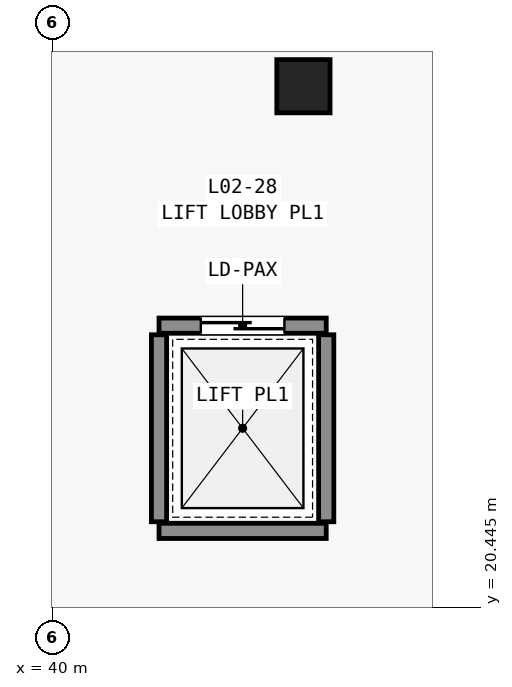
"""IFC4 building model, lengths in metres.
Left out: names, types, materials, properties, quantities, classifications, styles, units other than length and angle.
Written with IfcOpenShell. Run it as: python <this file> out.ifc"""

import sys

from ifc_helpers import new_model, si_unit, direction, frame, frame_2d, origin, origin_2d, place, context, subcontext, project, spatial, rectangle, extrude, element, fill, save


model = new_model("IFC4")
c1 = context("Model", 3, precision=1e-05, world=origin(), true_north=direction((0.0, 1.0)))
c2 = subcontext(c1, "Body", "Model", "MODEL_VIEW")
j1 = project(units=[si_unit("LENGTHUNIT", "METRE"), si_unit("PLANEANGLEUNIT", "RADIAN")], contexts=[c1])
p1 = place(None, origin())
s1 = spatial("IfcSite", under=j1, at=p1, CompositionType="ELEMENT")
p2 = place(p1, origin())
s2 = spatial("IfcBuilding", under=s1, at=p2, CompositionType="ELEMENT")
p3 = place(p2, frame((0.0, 0.0, 11.4)))
s3 = spatial("IfcBuildingStorey", under=s2, at=p3, CompositionType="ELEMENT", Elevation=11.4)
p4 = place(p3, frame((43.3, 27.3, 0.0), z_axis=(0.0, 0.0, 1.0), x_axis=(1.0, 0.0, 0.0)))
e1 = element("IfcColumn", 1, at=p4, inside=s3, PredefinedType="COLUMN", context=c2, shape_type="SweptSolid", body=[
    extrude(rectangle(XDim=0.7, YDim=0.7, at=origin_2d()), origin(), (0.0, 0.0, 1.0), 4.8),
])
p5 = place(p3, frame((41.4, 21.45, 0.0), z_axis=(0.0, 0.0, 1.0), x_axis=(1.0, 0.0, 0.0)))
e2 = element("IfcWall", 2, at=p5, inside=s3, PredefinedType="STANDARD", context=c2, shape_type="SweptSolid", body=[
    extrude(rectangle(XDim=2.2, YDim=0.2, at=frame_2d((1.1, 0.0))), origin(), (0.0, 0.0, 1.0), 4.45),
])
p6 = place(p3, frame((41.4, 24.15, 0.0), z_axis=(0.0, 0.0, 1.0), x_axis=(1.0, 0.0, 0.0)))
e3 = element("IfcWall", 3, at=p6, inside=s3, PredefinedType="STANDARD", context=c2, shape_type="SweptSolid", body=[
    extrude(rectangle(XDim=2.2, YDim=0.2, at=frame_2d((1.1, 0.0))), origin(), (0.0, 0.0, 1.0), 4.45),
])
p7 = place(p6, frame((0.55, 0.0, 0.0)))
e4 = element("IfcOpeningElement", 4, at=p7, cuts=e3, PredefinedType="OPENING", context=c2, shape_type="SweptSolid", body=[
    extrude(rectangle(XDim=1.1, YDim=2.15, at=frame_2d((0.55, 1.075))), frame((0.0, 0.11, 0.0), z_axis=(0.0, -1.0, 0.0), x_axis=(1.0, 0.0, 0.0)), (0.0, 0.0, 1.0), 0.22),
])
for number, where, z_axis, x_axis in (
    (5, (41.4, 21.57, 0.0), (0.0, 0.0, 1.0), (0.0, 1.0, 0.0)),
    (6, (43.6, 21.57, 0.0), (0.0, 0.0, 1.0), (0.0, 1.0, 0.0)),
):
    element("IfcWall", number, at=place(p3, frame(where, z_axis=z_axis, x_axis=x_axis)), inside=s3, PredefinedType="STANDARD", context=c2, shape_type="SweptSolid", body=[
        extrude(rectangle(XDim=2.46, YDim=0.2, at=frame_2d((1.23, 0.0))), origin(), (0.0, 0.0, 1.0), 4.45),
    ])
p8 = place(p7, origin())
e7 = element("IfcDoor", 7, at=p8, inside=s3, OperationType="SLIDING_TO_LEFT", PredefinedType="DOOR", context=c2, shape_type="SweptSolid", body=[
    extrude(rectangle(XDim=1.1, YDim=2.15, at=frame_2d((0.55, 1.075))), frame((0.0, 0.025, 0.0), z_axis=(0.0, -1.0, 0.0), x_axis=(1.0, 0.0, 0.0)), (0.0, 0.0, 1.0), 0.05),
])
fill(e4, e7)
save(model, sys.argv[1])
